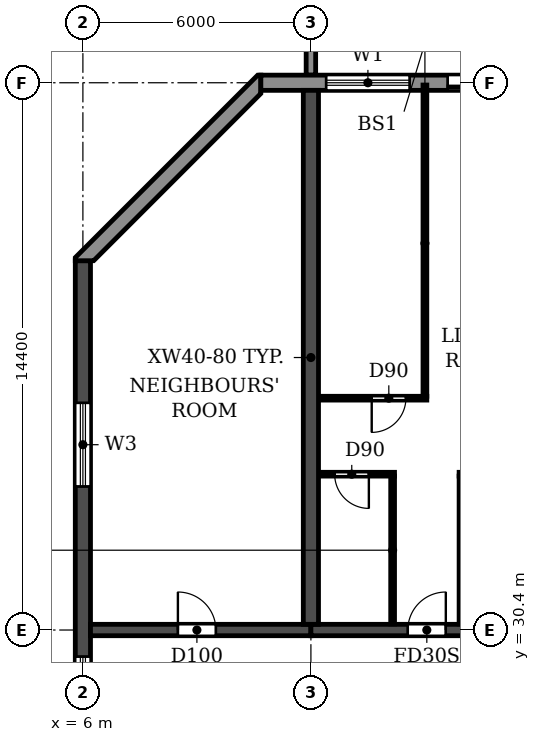
"""IFC4 building model, lengths in metres.
Left out: names, types, materials, properties, quantities, classifications, styles, units other than length and angle.
Written with IfcOpenShell. Run it as: python <this file> out.ifc"""

import sys

from ifc_helpers import new_model, si_unit, direction, frame, frame_2d, origin, place, context, subcontext, project, spatial, polyline, rectangle, outline, extrude, source, transform, mapped, element, fill, save


model = new_model("IFC4")
c1 = context("Model", 3, precision=1e-05, world=origin(), true_north=direction((0.0, 1.0)))
c2 = subcontext(c1, "Body", "Model", "MODEL_VIEW")
j1 = project(units=[si_unit("LENGTHUNIT", "METRE"), si_unit("PLANEANGLEUNIT", "RADIAN")], contexts=[c1])
p1 = place(None, origin())
s1 = spatial("IfcSite", under=j1, at=p1, CompositionType="ELEMENT")
p2 = place(p1, origin())
s2 = spatial("IfcBuilding", under=s1, at=p2, CompositionType="ELEMENT")
p3 = place(p2, frame((0.0, 0.0, 63.0)))
s3 = spatial("IfcBuildingStorey", under=s2, at=p3, CompositionType="ELEMENT", Elevation=63.0)
p4 = place(p3, frame((12.0, 30.55, 0.0), z_axis=(0.0, 0.0, 1.0), x_axis=(0.0, 1.0, 0.0)))
e1 = element("IfcWall", 1, at=p4, inside=s3, PredefinedType="SHEAR", context=c2, shape_type="SweptSolid", body=[
    extrude(rectangle(XDim=14.05, YDim=0.4, at=frame_2d((7.025, 0.0))), origin(), (0.0, 0.0, 1.0), 2.95),
])
p5 = place(p3, frame((6.0, 4.683, 0.0), z_axis=(0.0, 0.0, 1.0), x_axis=(0.0, 1.0, 0.0)))
e2 = element("IfcWall", 2, at=p5, inside=s3, PredefinedType="SHEAR", context=c2, shape_type="SweptSolid", body=[
    extrude(rectangle(XDim=35.434, YDim=0.4, at=frame_2d((17.717, 0.0))), origin(), (0.0, 0.0, 1.0), 2.95),
])
p6 = place(p5, frame((23.817, 0.0, 0.9)))
e3 = element("IfcOpeningElement", 3, at=p6, cuts=e2, PredefinedType="OPENING", context=c2, shape_type="SweptSolid", body=[
    extrude(rectangle(XDim=1.2, YDim=1.5, at=frame_2d((0.6, 0.75))), frame((0.0, 0.21, 0.0), z_axis=(0.0, -1.0, 0.0), x_axis=(1.0, 0.0, 0.0)), (0.0, 0.0, 1.0), 0.42),
])
p7 = place(p5, frame((8.017, 0.0, 0.9)))
e4 = element("IfcOpeningElement", 4, at=p7, cuts=e2, PredefinedType="OPENING", context=c2, shape_type="SweptSolid", body=[
    extrude(rectangle(XDim=1.2, YDim=1.5, at=frame_2d((0.6, 0.75))), frame((0.0, 0.21, 0.0), z_axis=(0.0, -1.0, 0.0), x_axis=(1.0, 0.0, 0.0)), (0.0, 0.0, 1.0), 0.42),
])
p8 = place(p5, frame((15.917, 0.0, 0.9)))
e5 = element("IfcOpeningElement", 5, at=p8, cuts=e2, PredefinedType="OPENING", context=c2, shape_type="SweptSolid", body=[
    extrude(rectangle(XDim=1.2, YDim=1.5, at=frame_2d((0.6, 0.75))), frame((0.0, 0.21, 0.0), z_axis=(0.0, -1.0, 0.0), x_axis=(1.0, 0.0, 0.0)), (0.0, 0.0, 1.0), 0.42),
])
p9 = place(p5, frame((29.493, 0.0, 0.6)))
e6 = element("IfcOpeningElement", 6, at=p9, cuts=e2, PredefinedType="OPENING", context=c2, shape_type="SweptSolid", body=[
    extrude(rectangle(XDim=2.2, YDim=1.8, at=frame_2d((1.1, 0.9))), frame((0.0, 0.21, 0.0), z_axis=(0.0, -1.0, 0.0), x_axis=(1.0, 0.0, 0.0)), (0.0, 0.0, 1.0), 0.42),
])
p10 = place(p5, frame((2.541, 0.0, 0.6)))
e7 = element("IfcOpeningElement", 7, at=p10, cuts=e2, PredefinedType="OPENING", context=c2, shape_type="SweptSolid", body=[
    extrude(rectangle(XDim=2.2, YDim=1.8, at=frame_2d((1.1, 0.9))), frame((0.0, 0.21, 0.0), z_axis=(0.0, -1.0, 0.0), x_axis=(1.0, 0.0, 0.0)), (0.0, 0.0, 1.0), 0.42),
])
p11 = place(p3, frame((6.2, 30.4, 0.0), z_axis=(0.0, 0.0, 1.0), x_axis=(1.0, 0.0, 0.0)))
e8 = element("IfcWall", 8, at=p11, inside=s3, PredefinedType="SHEAR", context=c2, shape_type="SweptSolid", body=[
    extrude(rectangle(XDim=5.8, YDim=0.3, at=frame_2d((2.9, 0.0))), origin(), (0.0, 0.0, 1.0), 2.35),
])
p12 = place(p11, frame((2.3, 0.0, 0.0)))
e9 = element("IfcOpeningElement", 9, at=p12, cuts=e8, PredefinedType="OPENING", context=c2, shape_type="SweptSolid", body=[
    extrude(rectangle(XDim=1.0, YDim=2.1, at=frame_2d((0.5, 1.05))), frame((0.0, 0.16, 0.0), z_axis=(0.0, -1.0, 0.0), x_axis=(1.0, 0.0, 0.0)), (0.0, 0.0, 1.0), 0.32),
])
p13 = place(p3, frame((12.0, 30.4, 0.0), z_axis=(0.0, 0.0, 1.0), x_axis=(1.0, 0.0, 0.0)))
e10 = element("IfcWall", 10, at=p13, inside=s3, PredefinedType="SHEAR", context=c2, shape_type="SweptSolid", body=[
    extrude(rectangle(XDim=6.0, YDim=0.3, at=frame_2d((3.0, 0.0))), origin(), (0.0, 0.0, 1.0), 2.35),
])
p14 = place(p13, frame((2.55, 0.0, 0.0)))
e11 = element("IfcOpeningElement", 11, at=p14, cuts=e10, PredefinedType="OPENING", context=c2, shape_type="SweptSolid", body=[
    extrude(rectangle(XDim=1.0, YDim=2.1, at=frame_2d((0.5, 1.05))), frame((0.0, 0.16, 0.0), z_axis=(0.0, -1.0, 0.0), x_axis=(1.0, 0.0, 0.0)), (0.0, 0.0, 1.0), 0.32),
])
p15 = place(p3, frame((91.317, 44.8, 0.0), z_axis=(0.0, 0.0, 1.0), x_axis=(-1.0, 0.0, 0.0)))
e12 = element("IfcWall", 12, at=p15, inside=s3, PredefinedType="STANDARD", context=c2, shape_type="SweptSolid", body=[
    extrude(rectangle(XDim=80.634, YDim=0.4, at=frame_2d((40.317, 0.0))), origin(), (0.0, 0.0, 1.0), 2.95),
])
p16 = place(p15, frame((76.717, 0.0, 0.9)))
e13 = element("IfcOpeningElement", 13, at=p16, cuts=e12, PredefinedType="OPENING", context=c2, shape_type="SweptSolid", body=[
    extrude(rectangle(XDim=2.2, YDim=1.5, at=frame_2d((1.1, 0.75))), frame((0.0, 0.21, 0.0), z_axis=(0.0, -1.0, 0.0), x_axis=(1.0, 0.0, 0.0)), (0.0, 0.0, 1.0), 0.42),
])
p17 = place(p15, frame((73.917, 0.0, 0.0)))
e14 = element("IfcOpeningElement", 14, at=p17, cuts=e12, PredefinedType="OPENING", context=c2, shape_type="SweptSolid", body=[
    extrude(rectangle(XDim=1.8, YDim=2.4, at=frame_2d((0.9, 1.2))), frame((0.0, 0.21, 0.0), z_axis=(0.0, -1.0, 0.0), x_axis=(1.0, 0.0, 0.0)), (0.0, 0.0, 1.0), 0.42),
])
p18 = place(p15, frame((70.717, 0.0, 0.9)))
e15 = element("IfcOpeningElement", 15, at=p18, cuts=e12, PredefinedType="OPENING", context=c2, shape_type="SweptSolid", body=[
    extrude(rectangle(XDim=2.2, YDim=1.5, at=frame_2d((1.1, 0.75))), frame((0.0, 0.21, 0.0), z_axis=(0.0, -1.0, 0.0), x_axis=(1.0, 0.0, 0.0)), (0.0, 0.0, 1.0), 0.42),
])
p19 = place(p15, frame((67.917, 0.0, 0.0)))
e16 = element("IfcOpeningElement", 16, at=p19, cuts=e12, PredefinedType="OPENING", context=c2, shape_type="SweptSolid", body=[
    extrude(rectangle(XDim=1.8, YDim=2.4, at=frame_2d((0.9, 1.2))), frame((0.0, 0.21, 0.0), z_axis=(0.0, -1.0, 0.0), x_axis=(1.0, 0.0, 0.0)), (0.0, 0.0, 1.0), 0.42),
])
p20 = place(p15, frame((64.717, 0.0, 0.9)))
e17 = element("IfcOpeningElement", 17, at=p20, cuts=e12, PredefinedType="OPENING", context=c2, shape_type="SweptSolid", body=[
    extrude(rectangle(XDim=2.2, YDim=1.5, at=frame_2d((1.1, 0.75))), frame((0.0, 0.21, 0.0), z_axis=(0.0, -1.0, 0.0), x_axis=(1.0, 0.0, 0.0)), (0.0, 0.0, 1.0), 0.42),
])
p21 = place(p15, frame((61.917, 0.0, 0.0)))
e18 = element("IfcOpeningElement", 18, at=p21, cuts=e12, PredefinedType="OPENING", context=c2, shape_type="SweptSolid", body=[
    extrude(rectangle(XDim=1.8, YDim=2.4, at=frame_2d((0.9, 1.2))), frame((0.0, 0.21, 0.0), z_axis=(0.0, -1.0, 0.0), x_axis=(1.0, 0.0, 0.0)), (0.0, 0.0, 1.0), 0.42),
])
p22 = place(p15, frame((58.717, 0.0, 0.9)))
e19 = element("IfcOpeningElement", 19, at=p22, cuts=e12, PredefinedType="OPENING", context=c2, shape_type="SweptSolid", body=[
    extrude(rectangle(XDim=2.2, YDim=1.5, at=frame_2d((1.1, 0.75))), frame((0.0, 0.21, 0.0), z_axis=(0.0, -1.0, 0.0), x_axis=(1.0, 0.0, 0.0)), (0.0, 0.0, 1.0), 0.42),
])
p23 = place(p15, frame((55.717, 0.0, 0.9)))
e20 = element("IfcOpeningElement", 20, at=p23, cuts=e12, PredefinedType="OPENING", context=c2, shape_type="SweptSolid", body=[
    extrude(rectangle(XDim=2.2, YDim=1.5, at=frame_2d((1.1, 0.75))), frame((0.0, 0.21, 0.0), z_axis=(0.0, -1.0, 0.0), x_axis=(1.0, 0.0, 0.0)), (0.0, 0.0, 1.0), 0.42),
])
p24 = place(p15, frame((52.917, 0.0, 0.0)))
e21 = element("IfcOpeningElement", 21, at=p24, cuts=e12, PredefinedType="OPENING", context=c2, shape_type="SweptSolid", body=[
    extrude(rectangle(XDim=1.8, YDim=2.4, at=frame_2d((0.9, 1.2))), frame((0.0, 0.21, 0.0), z_axis=(0.0, -1.0, 0.0), x_axis=(1.0, 0.0, 0.0)), (0.0, 0.0, 1.0), 0.42),
])
p25 = place(p15, frame((49.717, 0.0, 0.9)))
e22 = element("IfcOpeningElement", 22, at=p25, cuts=e12, PredefinedType="OPENING", context=c2, shape_type="SweptSolid", body=[
    extrude(rectangle(XDim=2.2, YDim=1.5, at=frame_2d((1.1, 0.75))), frame((0.0, 0.21, 0.0), z_axis=(0.0, -1.0, 0.0), x_axis=(1.0, 0.0, 0.0)), (0.0, 0.0, 1.0), 0.42),
])
p26 = place(p15, frame((46.917, 0.0, 0.0)))
e23 = element("IfcOpeningElement", 23, at=p26, cuts=e12, PredefinedType="OPENING", context=c2, shape_type="SweptSolid", body=[
    extrude(rectangle(XDim=1.8, YDim=2.4, at=frame_2d((0.9, 1.2))), frame((0.0, 0.21, 0.0), z_axis=(0.0, -1.0, 0.0), x_axis=(1.0, 0.0, 0.0)), (0.0, 0.0, 1.0), 0.42),
])
p27 = place(p15, frame((43.717, 0.0, 0.9)))
e24 = element("IfcOpeningElement", 24, at=p27, cuts=e12, PredefinedType="OPENING", context=c2, shape_type="SweptSolid", body=[
    extrude(rectangle(XDim=2.2, YDim=1.5, at=frame_2d((1.1, 0.75))), frame((0.0, 0.21, 0.0), z_axis=(0.0, -1.0, 0.0), x_axis=(1.0, 0.0, 0.0)), (0.0, 0.0, 1.0), 0.42),
])
p28 = place(p15, frame((40.717, 0.0, 0.9)))
e25 = element("IfcOpeningElement", 25, at=p28, cuts=e12, PredefinedType="OPENING", context=c2, shape_type="SweptSolid", body=[
    extrude(rectangle(XDim=2.2, YDim=1.5, at=frame_2d((1.1, 0.75))), frame((0.0, 0.21, 0.0), z_axis=(0.0, -1.0, 0.0), x_axis=(1.0, 0.0, 0.0)), (0.0, 0.0, 1.0), 0.42),
])
p29 = place(p15, frame((37.717, 0.0, 0.9)))
e26 = element("IfcOpeningElement", 26, at=p29, cuts=e12, PredefinedType="OPENING", context=c2, shape_type="SweptSolid", body=[
    extrude(rectangle(XDim=2.2, YDim=1.5, at=frame_2d((1.1, 0.75))), frame((0.0, 0.21, 0.0), z_axis=(0.0, -1.0, 0.0), x_axis=(1.0, 0.0, 0.0)), (0.0, 0.0, 1.0), 0.42),
])
p30 = place(p15, frame((34.717, 0.0, 0.9)))
e27 = element("IfcOpeningElement", 27, at=p30, cuts=e12, PredefinedType="OPENING", context=c2, shape_type="SweptSolid", body=[
    extrude(rectangle(XDim=2.2, YDim=1.5, at=frame_2d((1.1, 0.75))), frame((0.0, 0.21, 0.0), z_axis=(0.0, -1.0, 0.0), x_axis=(1.0, 0.0, 0.0)), (0.0, 0.0, 1.0), 0.42),
])
p31 = place(p15, frame((31.917, 0.0, 0.0)))
e28 = element("IfcOpeningElement", 28, at=p31, cuts=e12, PredefinedType="OPENING", context=c2, shape_type="SweptSolid", body=[
    extrude(rectangle(XDim=1.8, YDim=2.4, at=frame_2d((0.9, 1.2))), frame((0.0, 0.21, 0.0), z_axis=(0.0, -1.0, 0.0), x_axis=(1.0, 0.0, 0.0)), (0.0, 0.0, 1.0), 0.42),
])
p32 = place(p15, frame((28.917, 0.0, 0.0)))
e29 = element("IfcOpeningElement", 29, at=p32, cuts=e12, PredefinedType="OPENING", context=c2, shape_type="SweptSolid", body=[
    extrude(rectangle(XDim=1.8, YDim=2.4, at=frame_2d((0.9, 1.2))), frame((0.0, 0.21, 0.0), z_axis=(0.0, -1.0, 0.0), x_axis=(1.0, 0.0, 0.0)), (0.0, 0.0, 1.0), 0.42),
])
p33 = place(p15, frame((25.717, 0.0, 0.9)))
e30 = element("IfcOpeningElement", 30, at=p33, cuts=e12, PredefinedType="OPENING", context=c2, shape_type="SweptSolid", body=[
    extrude(rectangle(XDim=2.2, YDim=1.5, at=frame_2d((1.1, 0.75))), frame((0.0, 0.21, 0.0), z_axis=(0.0, -1.0, 0.0), x_axis=(1.0, 0.0, 0.0)), (0.0, 0.0, 1.0), 0.42),
])
p34 = place(p15, frame((22.917, 0.0, 0.0)))
e31 = element("IfcOpeningElement", 31, at=p34, cuts=e12, PredefinedType="OPENING", context=c2, shape_type="SweptSolid", body=[
    extrude(rectangle(XDim=1.8, YDim=2.4, at=frame_2d((0.9, 1.2))), frame((0.0, 0.21, 0.0), z_axis=(0.0, -1.0, 0.0), x_axis=(1.0, 0.0, 0.0)), (0.0, 0.0, 1.0), 0.42),
])
p35 = place(p15, frame((19.717, 0.0, 0.9)))
e32 = element("IfcOpeningElement", 32, at=p35, cuts=e12, PredefinedType="OPENING", context=c2, shape_type="SweptSolid", body=[
    extrude(rectangle(XDim=2.2, YDim=1.5, at=frame_2d((1.1, 0.75))), frame((0.0, 0.21, 0.0), z_axis=(0.0, -1.0, 0.0), x_axis=(1.0, 0.0, 0.0)), (0.0, 0.0, 1.0), 0.42),
])
p36 = place(p15, frame((16.917, 0.0, 0.0)))
e33 = element("IfcOpeningElement", 33, at=p36, cuts=e12, PredefinedType="OPENING", context=c2, shape_type="SweptSolid", body=[
    extrude(rectangle(XDim=1.8, YDim=2.4, at=frame_2d((0.9, 1.2))), frame((0.0, 0.21, 0.0), z_axis=(0.0, -1.0, 0.0), x_axis=(1.0, 0.0, 0.0)), (0.0, 0.0, 1.0), 0.42),
])
p37 = place(p15, frame((13.717, 0.0, 0.9)))
e34 = element("IfcOpeningElement", 34, at=p37, cuts=e12, PredefinedType="OPENING", context=c2, shape_type="SweptSolid", body=[
    extrude(rectangle(XDim=2.2, YDim=1.5, at=frame_2d((1.1, 0.75))), frame((0.0, 0.21, 0.0), z_axis=(0.0, -1.0, 0.0), x_axis=(1.0, 0.0, 0.0)), (0.0, 0.0, 1.0), 0.42),
])
p38 = place(p15, frame((10.917, 0.0, 0.0)))
e35 = element("IfcOpeningElement", 35, at=p38, cuts=e12, PredefinedType="OPENING", context=c2, shape_type="SweptSolid", body=[
    extrude(rectangle(XDim=1.8, YDim=2.4, at=frame_2d((0.9, 1.2))), frame((0.0, 0.21, 0.0), z_axis=(0.0, -1.0, 0.0), x_axis=(1.0, 0.0, 0.0)), (0.0, 0.0, 1.0), 0.42),
])
p39 = place(p15, frame((7.717, 0.0, 0.9)))
e36 = element("IfcOpeningElement", 36, at=p39, cuts=e12, PredefinedType="OPENING", context=c2, shape_type="SweptSolid", body=[
    extrude(rectangle(XDim=2.2, YDim=1.5, at=frame_2d((1.1, 0.75))), frame((0.0, 0.21, 0.0), z_axis=(0.0, -1.0, 0.0), x_axis=(1.0, 0.0, 0.0)), (0.0, 0.0, 1.0), 0.42),
])
p40 = place(p15, frame((4.717, 0.0, 0.9)))
e37 = element("IfcOpeningElement", 37, at=p40, cuts=e12, PredefinedType="OPENING", context=c2, shape_type="SweptSolid", body=[
    extrude(rectangle(XDim=2.2, YDim=1.5, at=frame_2d((1.1, 0.75))), frame((0.0, 0.21, 0.0), z_axis=(0.0, -1.0, 0.0), x_axis=(1.0, 0.0, 0.0)), (0.0, 0.0, 1.0), 0.42),
])
p41 = place(p15, frame((1.717, 0.0, 0.9)))
e38 = element("IfcOpeningElement", 38, at=p41, cuts=e12, PredefinedType="OPENING", context=c2, shape_type="SweptSolid", body=[
    extrude(rectangle(XDim=2.2, YDim=1.5, at=frame_2d((1.1, 0.75))), frame((0.0, 0.21, 0.0), z_axis=(0.0, -1.0, 0.0), x_axis=(1.0, 0.0, 0.0)), (0.0, 0.0, 1.0), 0.42),
])
p42 = place(p3, origin())
e39 = element("IfcWall", 39, at=p42, inside=s3, PredefinedType="STANDARD", context=c2, shape_type="SweptSolid", body=[
    extrude(outline(polyline([(10.683, 45.0), (10.6, 45.0), (5.8, 40.2), (5.8, 40.117), (6.283, 40.117), (10.683, 44.517), (10.683, 45.0)])), origin(), (0.0, 0.0, 1.0), 2.95),
])
m1 = source(origin(), c2, "Body", "SweptSolid", [
    extrude(outline(polyline([(0.0, 0.0), (0.25, 0.0), (0.25, 3.1), (0.0, 3.1), (0.0, 0.0)])), origin(), (0.0, 0.0, 1.0), 3.1),
])
p43 = place(p3, frame((11.875, 45.0, 0.0)))
e40 = element("IfcWall", 40, at=p43, inside=s3, PredefinedType="STANDARD", context=c2, shape_type="MappedRepresentation", body=[
    mapped(m1, transform((0.0, 0.0, 0.0))),
])
p44 = place(p3, frame((12.21, 34.5, 0.0), z_axis=(0.0, 0.0, 1.0), x_axis=(1.0, 0.0, 0.0)))
e41 = element("IfcWall", 41, at=p44, inside=s3, PredefinedType="PARTITIONING", context=c2, shape_type="SweptSolid", body=[
    extrude(rectangle(XDim=1.99, YDim=0.1, at=frame_2d((0.995, 0.0))), origin(), (0.0, 0.0, 1.0), 2.95),
])
p45 = place(p44, frame((0.415, 0.0, 0.0)))
e42 = element("IfcOpeningElement", 42, at=p45, cuts=e41, PredefinedType="OPENING", context=c2, shape_type="SweptSolid", body=[
    extrude(rectangle(XDim=0.9, YDim=2.1, at=frame_2d((0.45, 1.05))), frame((0.0, 0.06, 0.0), z_axis=(0.0, -1.0, 0.0), x_axis=(1.0, 0.0, 0.0)), (0.0, 0.0, 1.0), 0.12),
])
p46 = place(p3, frame((15.9, 34.5, 0.0), z_axis=(0.0, 0.0, 1.0), x_axis=(1.0, 0.0, 0.0)))
e43 = element("IfcWall", 43, at=p46, inside=s3, PredefinedType="PARTITIONING", context=c2, shape_type="SweptSolid", body=[
    extrude(rectangle(XDim=1.89, YDim=0.1, at=frame_2d((0.945, 0.0))), origin(), (0.0, 0.0, 1.0), 2.95),
])
p47 = place(p46, frame((0.675, 0.0, 0.0)))
e44 = element("IfcOpeningElement", 44, at=p47, cuts=e43, PredefinedType="OPENING", context=c2, shape_type="SweptSolid", body=[
    extrude(rectangle(XDim=0.8, YDim=2.1, at=frame_2d((0.4, 1.05))), frame((0.0, 0.06, 0.0), z_axis=(0.0, -1.0, 0.0), x_axis=(1.0, 0.0, 0.0)), (0.0, 0.0, 1.0), 0.12),
])
p48 = place(p3, frame((12.21, 36.5, 0.0), z_axis=(0.0, 0.0, 1.0), x_axis=(1.0, 0.0, 0.0)))
e45 = element("IfcWall", 45, at=p48, inside=s3, PredefinedType="PARTITIONING", context=c2, shape_type="SweptSolid", body=[
    extrude(rectangle(XDim=2.84, YDim=0.1, at=frame_2d((1.42, 0.0))), origin(), (0.0, 0.0, 1.0), 2.95),
])
p49 = place(p48, frame((1.39, 0.0, 0.0)))
e46 = element("IfcOpeningElement", 46, at=p49, cuts=e45, PredefinedType="OPENING", context=c2, shape_type="SweptSolid", body=[
    extrude(rectangle(XDim=0.9, YDim=2.1, at=frame_2d((0.45, 1.05))), frame((0.0, 0.06, 0.0), z_axis=(0.0, -1.0, 0.0), x_axis=(1.0, 0.0, 0.0)), (0.0, 0.0, 1.0), 0.12),
])
p50 = place(p3, frame((14.15, 30.56, 0.0), z_axis=(0.0, 0.0, 1.0), x_axis=(0.0, 1.0, 0.0)))
e47 = element("IfcWall", 47, at=p50, inside=s3, PredefinedType="PARTITIONING", context=c2, shape_type="SweptSolid", body=[
    extrude(rectangle(XDim=3.89, YDim=0.1, at=frame_2d((1.945, 0.0))), origin(), (0.0, 0.0, 1.0), 2.95),
])
p51 = place(p3, frame((15.0, 36.55, 0.0), z_axis=(0.0, 0.0, 1.0), x_axis=(0.0, 1.0, 0.0)))
e48 = element("IfcWall", 48, at=p51, inside=s3, PredefinedType="PARTITIONING", context=c2, shape_type="SweptSolid", body=[
    extrude(rectangle(XDim=8.19, YDim=0.1, at=frame_2d((4.095, 0.0))), origin(), (0.0, 0.0, 1.0), 2.95),
])
p52 = place(p3, frame((15.95, 30.56, 0.0), z_axis=(0.0, 0.0, 1.0), x_axis=(0.0, 1.0, 0.0)))
e49 = element("IfcWall", 49, at=p52, inside=s3, PredefinedType="PARTITIONING", context=c2, shape_type="SweptSolid", body=[
    extrude(rectangle(XDim=3.89, YDim=0.1, at=frame_2d((1.945, 0.0))), origin(), (0.0, 0.0, 1.0), 2.95),
])
p53 = place(p16, origin())
e50 = element("IfcWindow", 50, at=p53, inside=s3, PartitioningType="DOUBLE_PANEL_HORIZONTAL", PredefinedType="WINDOW", context=c2, shape_type="SweptSolid", body=[
    extrude(rectangle(XDim=2.2, YDim=1.5, at=frame_2d((1.1, 0.75))), frame((0.0, 0.03, 0.0), z_axis=(0.0, -1.0, 0.0), x_axis=(1.0, 0.0, 0.0)), (0.0, 0.0, 1.0), 0.06),
])
fill(e13, e50)
p54 = place(p17, origin())
e51 = element("IfcDoor", 51, at=p54, inside=s3, OperationType="DOUBLE_DOOR_SLIDING", PredefinedType="DOOR", context=c2, shape_type="SweptSolid", body=[
    extrude(rectangle(XDim=1.8, YDim=2.4, at=frame_2d((0.9, 1.2))), frame((0.0, 0.025, 0.0), z_axis=(0.0, -1.0, 0.0), x_axis=(1.0, 0.0, 0.0)), (0.0, 0.0, 1.0), 0.05),
])
fill(e14, e51)
p55 = place(p6, origin())
e52 = element("IfcWindow", 52, at=p55, inside=s3, PartitioningType="SINGLE_PANEL", PredefinedType="WINDOW", context=c2, shape_type="SweptSolid", body=[
    extrude(rectangle(XDim=1.2, YDim=1.5, at=frame_2d((0.6, 0.75))), frame((0.0, 0.03, 0.0), z_axis=(0.0, -1.0, 0.0), x_axis=(1.0, 0.0, 0.0)), (0.0, 0.0, 1.0), 0.06),
])
fill(e3, e52)
p56 = place(p9, origin())
e53 = element("IfcWindow", 53, at=p56, inside=s3, PartitioningType="DOUBLE_PANEL_HORIZONTAL", PredefinedType="WINDOW", context=c2, shape_type="SweptSolid", body=[
    extrude(rectangle(XDim=2.2, YDim=1.8, at=frame_2d((1.1, 0.9))), frame((0.0, 0.03, 0.0), z_axis=(0.0, -1.0, 0.0), x_axis=(1.0, 0.0, 0.0)), (0.0, 0.0, 1.0), 0.06),
])
fill(e6, e53)
p57 = place(p12, origin())
e54 = element("IfcDoor", 54, at=p57, inside=s3, OperationType="SINGLE_SWING_LEFT", PredefinedType="DOOR", context=c2, shape_type="SweptSolid", body=[
    extrude(rectangle(XDim=1.0, YDim=2.1, at=frame_2d((0.5, 1.05))), frame((0.0, 0.025, 0.0), z_axis=(0.0, -1.0, 0.0), x_axis=(1.0, 0.0, 0.0)), (0.0, 0.0, 1.0), 0.05),
])
fill(e9, e54)
p58 = place(p45, frame((0.9, 0.0, 0.0), z_axis=(0.0, 0.0, 1.0), x_axis=(-1.0, 0.0, 0.0)))
e55 = element("IfcDoor", 55, at=p58, inside=s3, OperationType="SINGLE_SWING_LEFT", PredefinedType="DOOR", context=c2, shape_type="SweptSolid", body=[
    extrude(rectangle(XDim=0.9, YDim=2.1, at=frame_2d((0.45, 1.05))), frame((0.0, 0.025, 0.0), z_axis=(0.0, -1.0, 0.0), x_axis=(1.0, 0.0, 0.0)), (0.0, 0.0, 1.0), 0.05),
])
fill(e42, e55)
p59 = place(p49, frame((0.9, 0.0, 0.0), z_axis=(0.0, 0.0, 1.0), x_axis=(-1.0, 0.0, 0.0)))
e56 = element("IfcDoor", 56, at=p59, inside=s3, OperationType="SINGLE_SWING_RIGHT", PredefinedType="DOOR", context=c2, shape_type="SweptSolid", body=[
    extrude(rectangle(XDim=0.9, YDim=2.1, at=frame_2d((0.45, 1.05))), frame((0.0, 0.025, 0.0), z_axis=(0.0, -1.0, 0.0), x_axis=(1.0, 0.0, 0.0)), (0.0, 0.0, 1.0), 0.05),
])
fill(e46, e56)
p60 = place(p14, origin())
e57 = element("IfcDoor", 57, at=p60, inside=s3, OperationType="SINGLE_SWING_RIGHT", PredefinedType="DOOR", context=c2, shape_type="SweptSolid", body=[
    extrude(rectangle(XDim=1.0, YDim=2.1, at=frame_2d((0.5, 1.05))), frame((0.0, 0.025, 0.0), z_axis=(0.0, -1.0, 0.0), x_axis=(1.0, 0.0, 0.0)), (0.0, 0.0, 1.0), 0.05),
])
fill(e11, e57)
save(model, sys.argv[1])
